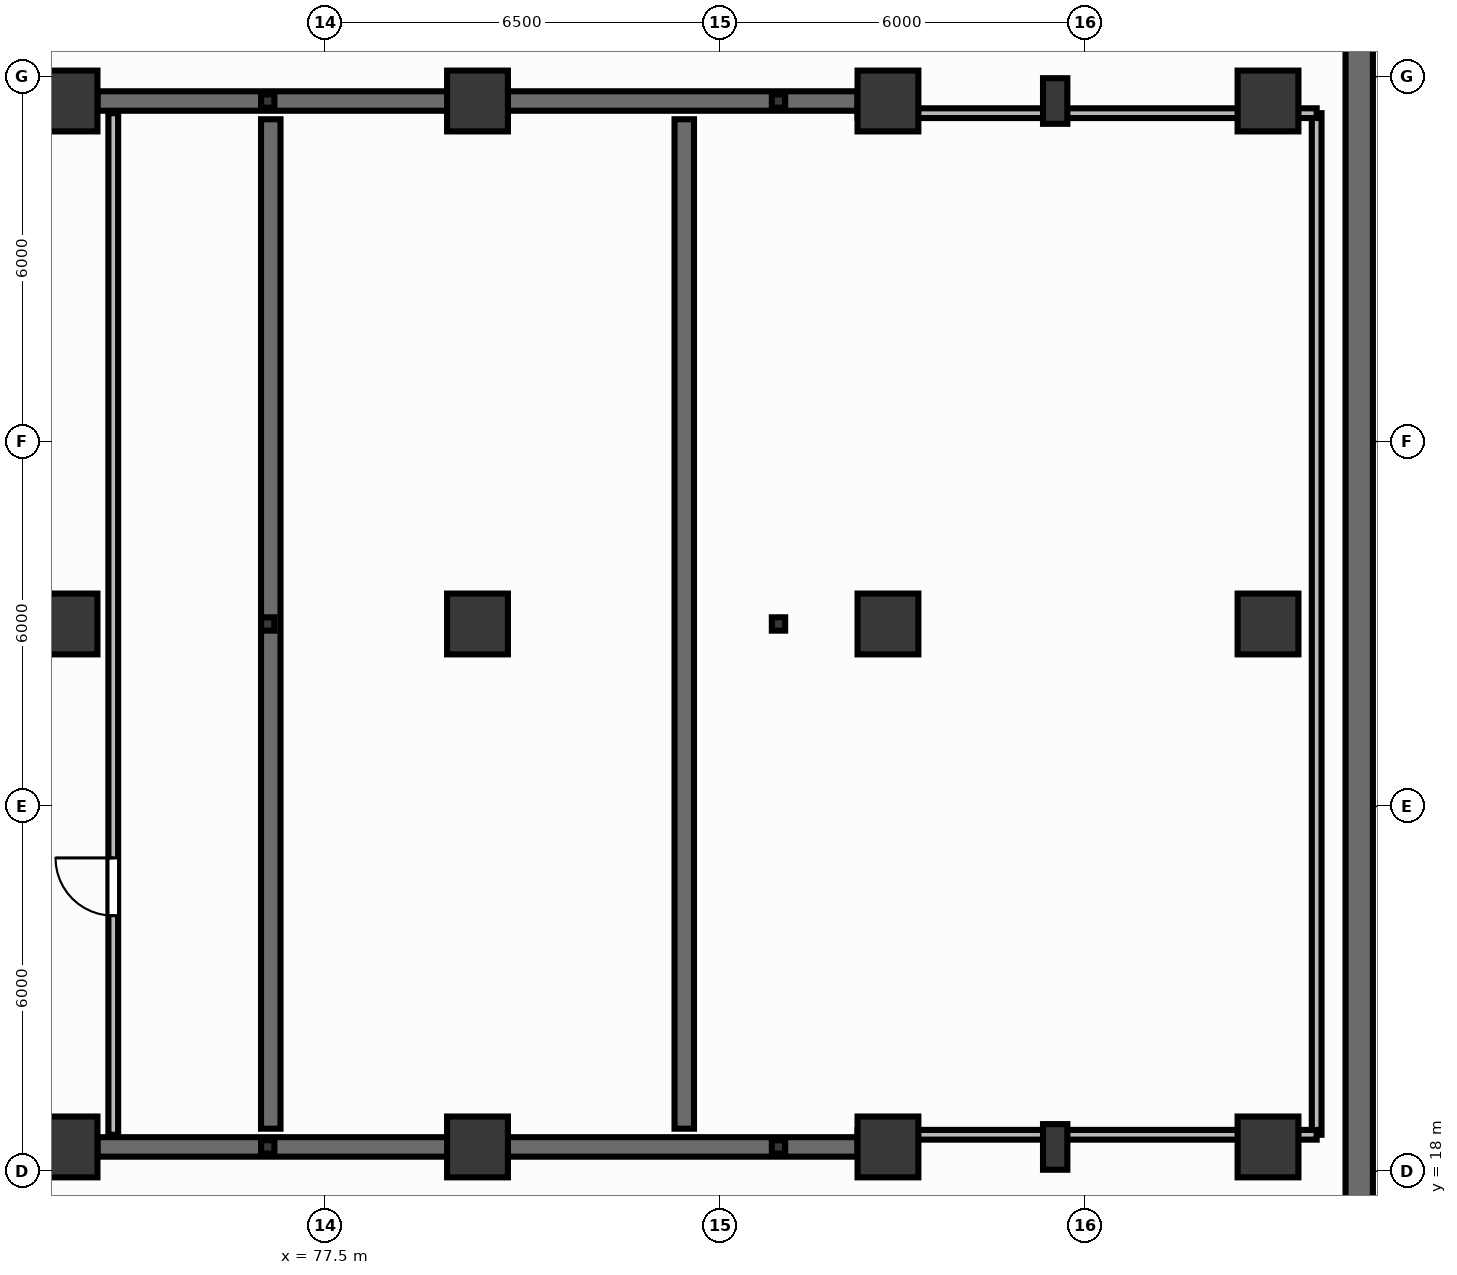
"""IFC4 building model, lengths in metres.
Left out: names, types, materials, properties, quantities, classifications, styles, units other than length and angle.
Written with IfcOpenShell. Run it as: python <this file> out.ifc"""

import sys

from ifc_helpers import new_model, si_unit, direction, frame, frame_2d, origin, origin_2d, place, context, subcontext, project, spatial, rectangle, hollow_circle, i_section, extrude, element, fill, save


model = new_model("IFC4")
c1 = context("Model", 3, precision=1e-05, world=origin(), true_north=direction((0.0, 1.0)))
c2 = subcontext(c1, "Body", "Model", "MODEL_VIEW")
j1 = project(units=[si_unit("LENGTHUNIT", "METRE"), si_unit("PLANEANGLEUNIT", "RADIAN")], contexts=[c1])
p1 = place(None, origin())
s1 = spatial("IfcSite", under=j1, at=p1, CompositionType="ELEMENT")
p2 = place(p1, origin())
s2 = spatial("IfcBuilding", under=s1, at=p2, CompositionType="ELEMENT")
p3 = place(p2, frame((0.0, 0.0, -4.5)))
s3 = spatial("IfcBuildingStorey", under=s2, at=p3, CompositionType="ELEMENT", Elevation=-4.5)
p4 = place(p3, frame((94.5, 50.75, 0.0), z_axis=(0.0, 0.0, 1.0), x_axis=(0.0, -1.0, 0.0)))
e1 = element("IfcWall", 1, at=p4, inside=s3, PredefinedType="USERDEFINED", context=c2, shape_type="SweptSolid", body=[
    extrude(rectangle(XDim=47.5, YDim=0.45, at=frame_2d((23.75, 0.0))), origin(), (0.0, 0.0, 1.0), 4.182),
])
for number, where, z_axis, x_axis in (
    (2, (73.25, 18.4, 0.0), (0.0, 0.0, 1.0), (1.0, 0.0, 0.0)),
    (3, (73.25, 27.0, 0.0), (0.0, 0.0, 1.0), (1.0, 0.0, 0.0)),
    (4, (73.25, 35.6, 0.0), (0.0, 0.0, 1.0), (1.0, 0.0, 0.0)),
    (5, (80.0, 18.4, 0.0), (0.0, 0.0, 1.0), (1.0, 0.0, 0.0)),
    (6, (80.0, 27.0, 0.0), (0.0, 0.0, 1.0), (1.0, 0.0, 0.0)),
    (7, (80.0, 35.6, 0.0), (0.0, 0.0, 1.0), (1.0, 0.0, 0.0)),
    (8, (86.75, 18.4, 0.0), (0.0, 0.0, 1.0), (1.0, 0.0, 0.0)),
    (9, (86.75, 27.0, 0.0), (0.0, 0.0, 1.0), (1.0, 0.0, 0.0)),
    (10, (86.75, 35.6, 0.0), (0.0, 0.0, 1.0), (1.0, 0.0, 0.0)),
    (11, (93.0, 18.4, 0.0), (0.0, 0.0, 1.0), (1.0, 0.0, 0.0)),
    (12, (93.0, 27.0, 0.0), (0.0, 0.0, 1.0), (1.0, 0.0, 0.0)),
    (13, (93.0, 35.6, 0.0), (0.0, 0.0, 1.0), (1.0, 0.0, 0.0)),
):
    element("IfcColumn", number, at=place(p3, frame(where, z_axis=z_axis, x_axis=x_axis)), inside=s3, PredefinedType="COLUMN", context=c2, shape_type="SweptSolid", body=[
        extrude(rectangle(XDim=1.0, YDim=1.0, at=origin_2d()), origin(), (0.0, 0.0, 1.0), 4.18),
    ])
for number, where, z_axis, x_axis in (
    (14, (89.5, 18.4, 0.0), (0.0, 0.0, 1.0), (1.0, 0.0, 0.0)),
    (15, (89.5, 35.6, 0.0), (0.0, 0.0, 1.0), (1.0, 0.0, 0.0)),
):
    element("IfcColumn", number, at=place(p3, frame(where, z_axis=z_axis, x_axis=x_axis)), inside=s3, PredefinedType="COLUMN", context=c2, shape_type="SweptSolid", body=[
        extrude(i_section(OverallWidth=0.4, OverallDepth=0.75, WebThickness=0.016, FlangeThickness=0.028, at=origin_2d()), origin(), (0.0, 0.0, 1.0), 4.18),
    ])
p5 = place(p3, frame((84.95, 18.4, 0.0), z_axis=(0.0, 0.0, 1.0), x_axis=(1.0, 0.0, 0.0)))
e16 = element("IfcColumn", 16, at=p5, inside=s3, PredefinedType="COLUMN", context=c2, shape_type="SweptSolid", body=[
    extrude(hollow_circle(Radius=0.11, WallThickness=0.012, at=origin_2d()), origin(), (0.0, 0.0, 1.0), 4.18),
])
p6 = place(p3, frame((76.55, 18.4, 0.0), z_axis=(0.0, 0.0, 1.0), x_axis=(1.0, 0.0, 0.0)))
e17 = element("IfcColumn", 17, at=p6, inside=s3, PredefinedType="COLUMN", context=c2, shape_type="SweptSolid", body=[
    extrude(hollow_circle(Radius=0.11, WallThickness=0.012, at=origin_2d()), origin(), (0.0, 0.0, 1.0), 3.775),
])
p7 = place(p3, frame((84.95, 27.0, 0.0), z_axis=(0.0, 0.0, 1.0), x_axis=(1.0, 0.0, 0.0)))
e18 = element("IfcColumn", 18, at=p7, inside=s3, PredefinedType="COLUMN", context=c2, shape_type="SweptSolid", body=[
    extrude(hollow_circle(Radius=0.11, WallThickness=0.012, at=origin_2d()), origin(), (0.0, 0.0, 1.0), 4.18),
])
p8 = place(p3, frame((76.55, 27.0, 0.0), z_axis=(0.0, 0.0, 1.0), x_axis=(1.0, 0.0, 0.0)))
e19 = element("IfcColumn", 19, at=p8, inside=s3, PredefinedType="COLUMN", context=c2, shape_type="SweptSolid", body=[
    extrude(hollow_circle(Radius=0.11, WallThickness=0.012, at=origin_2d()), origin(), (0.0, 0.0, 1.0), 3.775),
])
p9 = place(p3, frame((84.95, 35.6, 0.0), z_axis=(0.0, 0.0, 1.0), x_axis=(1.0, 0.0, 0.0)))
e20 = element("IfcColumn", 20, at=p9, inside=s3, PredefinedType="COLUMN", context=c2, shape_type="SweptSolid", body=[
    extrude(hollow_circle(Radius=0.11, WallThickness=0.012, at=origin_2d()), origin(), (0.0, 0.0, 1.0), 4.18),
])
p10 = place(p3, frame((76.55, 35.6, 0.0), z_axis=(0.0, 0.0, 1.0), x_axis=(1.0, 0.0, 0.0)))
e21 = element("IfcColumn", 21, at=p10, inside=s3, PredefinedType="COLUMN", context=c2, shape_type="SweptSolid", body=[
    extrude(hollow_circle(Radius=0.11, WallThickness=0.012, at=origin_2d()), origin(), (0.0, 0.0, 1.0), 3.775),
])
for number, where, z_axis, x_axis in (
    (22, (73.75, 18.4, 0.0), (0.0, 0.0, 1.0), (1.0, 0.0, 0.0)),
    (23, (73.75, 35.6, 0.0), (0.0, 0.0, 1.0), (1.0, 0.0, 0.0)),
):
    element("IfcWall", number, at=place(p3, frame(where, z_axis=z_axis, x_axis=x_axis)), inside=s3, PredefinedType="SHEAR", context=c2, shape_type="SweptSolid", body=[
        extrude(rectangle(XDim=12.5, YDim=0.32, at=frame_2d((6.25, 0.0))), origin(), (0.0, 0.0, 1.0), 4.18),
    ])
for number, where, z_axis, x_axis in (
    (24, (76.6, 18.7, 0.0), (0.0, 0.0, 1.0), (0.0, 1.0, 0.0)),
    (25, (83.4, 18.7, 0.0), (0.0, 0.0, 1.0), (0.0, 1.0, 0.0)),
):
    element("IfcWall", number, at=place(p3, frame(where, z_axis=z_axis, x_axis=x_axis)), inside=s3, PredefinedType="SHEAR", context=c2, shape_type="SweptSolid", body=[
        extrude(rectangle(XDim=16.6, YDim=0.32, at=frame_2d((8.3, 0.0))), origin(), (0.0, 0.0, 1.0), 4.18),
    ])
p11 = place(p3, frame((74.01, 18.6, 0.0), z_axis=(0.0, 0.0, 1.0), x_axis=(0.0, 1.0, 0.0)))
e26 = element("IfcWall", 26, at=p11, inside=s3, PredefinedType="PARTITIONING", context=c2, shape_type="SweptSolid", body=[
    extrude(rectangle(XDim=16.8, YDim=0.16, at=frame_2d((8.4, 0.0))), origin(), (0.0, 0.0, 1.0), 3.04),
])
p12 = place(p11, frame((3.603, 0.0, 0.0)))
e27 = element("IfcOpeningElement", 27, at=p12, cuts=e26, PredefinedType="OPENING", context=c2, shape_type="SweptSolid", body=[
    extrude(rectangle(XDim=0.95, YDim=2.15, at=frame_2d((0.475, 1.075))), frame((0.0, 0.095, 0.0), z_axis=(0.0, -1.0, 0.0), x_axis=(1.0, 0.0, 0.0)), (0.0, 0.0, 1.0), 0.19),
])
p13 = place(p3, frame((93.8, 35.4, 0.0), z_axis=(0.0, 0.0, 1.0), x_axis=(0.0, -1.0, 0.0)))
e28 = element("IfcWall", 28, at=p13, inside=s3, PredefinedType="PARTITIONING", context=c2, shape_type="SweptSolid", body=[
    extrude(rectangle(XDim=16.8, YDim=0.16, at=frame_2d((8.4, 0.0))), origin(), (0.0, 0.0, 1.0), 3.04),
])
for number, where, z_axis, x_axis in (
    (29, (93.8, 18.6, 0.0), (0.0, 0.0, 1.0), (-1.0, 0.0, 0.0)),
    (30, (86.25, 35.4, 0.0), (0.0, 0.0, 1.0), (1.0, 0.0, 0.0)),
):
    element("IfcWall", number, at=place(p3, frame(where, z_axis=z_axis, x_axis=x_axis)), inside=s3, PredefinedType="PARTITIONING", context=c2, shape_type="SweptSolid", body=[
        extrude(rectangle(XDim=7.55, YDim=0.16, at=frame_2d((3.775, 0.0))), origin(), (0.0, 0.0, 1.0), 3.04),
    ])
p14 = place(p12, origin())
e31 = element("IfcDoor", 31, at=p14, inside=s3, OperationType="SINGLE_SWING_RIGHT", PredefinedType="DOOR", context=c2, shape_type="SweptSolid", body=[
    extrude(rectangle(XDim=0.95, YDim=2.15, at=frame_2d((0.475, 1.075))), frame((0.0, 0.025, 0.0), z_axis=(0.0, -1.0, 0.0), x_axis=(1.0, 0.0, 0.0)), (0.0, 0.0, 1.0), 0.05),
])
fill(e27, e31)
save(model, sys.argv[1])
